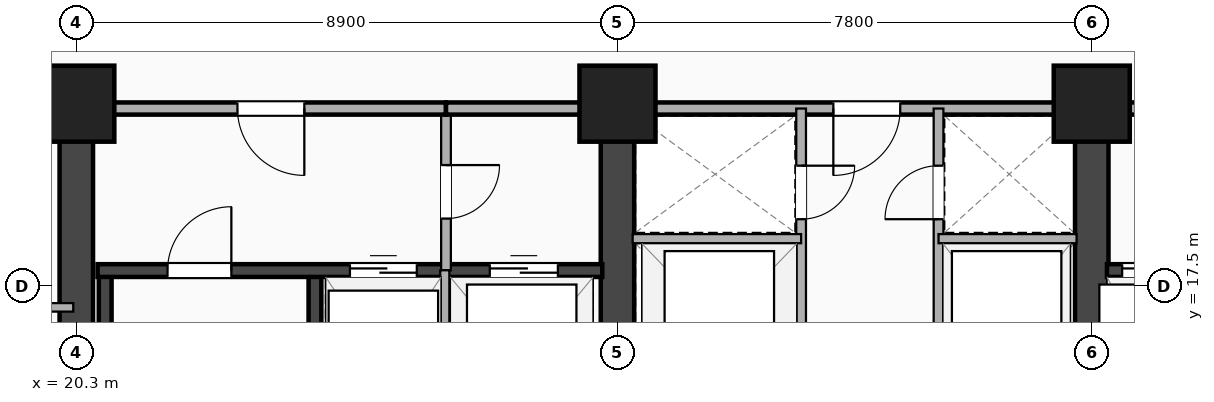
"""IFC4 building model, lengths in metres.
Left out: names, types, materials, properties, quantities, classifications, styles, units other than length and angle.
Written with IfcOpenShell. Run it as: python <this file> out.ifc"""

import sys

from ifc_helpers import new_model, si_unit, direction, frame, frame_2d, origin, origin_2d, place, context, subcontext, project, spatial, rectangle, extrude, element, fill, save


model = new_model("IFC4")
c1 = context("Model", 3, precision=1e-05, world=origin(), true_north=direction((0.0, 1.0)))
c2 = subcontext(c1, "Body", "Model", "MODEL_VIEW")
j1 = project(units=[si_unit("LENGTHUNIT", "METRE"), si_unit("PLANEANGLEUNIT", "RADIAN")], contexts=[c1])
p1 = place(None, origin())
s1 = spatial("IfcSite", under=j1, at=p1, CompositionType="ELEMENT")
p2 = place(p1, origin())
s2 = spatial("IfcBuilding", under=s1, at=p2, CompositionType="ELEMENT")
p3 = place(p2, frame((0.0, 0.0, 95.2)))
s3 = spatial("IfcBuildingStorey", under=s2, at=p3, CompositionType="ELEMENT", Elevation=95.2)
p4 = place(p3, frame((20.3, 3.5, 0.0), z_axis=(0.0, 0.0, 1.0), x_axis=(0.0, 1.0, 0.0)))
e1 = element("IfcWall", 1, at=p4, inside=s3, PredefinedType="SHEAR", context=c2, shape_type="SweptSolid", body=[
    extrude(rectangle(XDim=16.9, YDim=0.55, at=frame_2d((8.45, 0.0))), origin(), (0.0, 0.0, 1.0), 3.24),
])
p5 = place(p3, frame((29.2, 3.5, 0.0), z_axis=(0.0, 0.0, 1.0), x_axis=(0.0, 1.0, 0.0)))
e2 = element("IfcWall", 2, at=p5, inside=s3, PredefinedType="SHEAR", context=c2, shape_type="SweptSolid", body=[
    extrude(rectangle(XDim=16.9, YDim=0.55, at=frame_2d((8.45, 0.0))), origin(), (0.0, 0.0, 1.0), 3.24),
])
p6 = place(p5, frame((7.75, 0.0, 0.0), z_axis=(0.0, 0.0, 1.0), x_axis=(-1.0, 0.0, 0.0)))
e3 = element("IfcOpeningElement", 3, at=p6, cuts=e2, PredefinedType="OPENING", context=c2, shape_type="SweptSolid", body=[
    extrude(rectangle(XDim=1.1, YDim=2.15, at=frame_2d((0.55, 1.075))), frame((0.0, 0.285, 0.0), z_axis=(0.0, -1.0, 0.0), x_axis=(1.0, 0.0, 0.0)), (0.0, 0.0, 1.0), 0.57),
])
p7 = place(p3, frame((37.0, 3.5, 0.0), z_axis=(0.0, 0.0, 1.0), x_axis=(0.0, 1.0, 0.0)))
e4 = element("IfcWall", 4, at=p7, inside=s3, PredefinedType="SHEAR", context=c2, shape_type="SweptSolid", body=[
    extrude(rectangle(XDim=16.9, YDim=0.55, at=frame_2d((8.45, 0.0))), origin(), (0.0, 0.0, 1.0), 3.24),
])
p8 = place(p7, frame((6.65, 0.0, 0.0)))
e5 = element("IfcOpeningElement", 5, at=p8, cuts=e4, PredefinedType="OPENING", context=c2, shape_type="SweptSolid", body=[
    extrude(rectangle(XDim=1.1, YDim=2.15, at=frame_2d((0.55, 1.075))), frame((0.0, 0.285, 0.0), z_axis=(0.0, -1.0, 0.0), x_axis=(1.0, 0.0, 0.0)), (0.0, 0.0, 1.0), 0.57),
])
for number, where, z_axis, x_axis in (
    (6, (20.775, 9.745, 0.0), (0.0, 0.0, 1.0), (0.0, 1.0, 0.0)),
    (7, (24.225, 9.745, 0.0), (0.0, 0.0, 1.0), (0.0, 1.0, 0.0)),
):
    element("IfcWall", number, at=place(p3, frame(where, z_axis=z_axis, x_axis=x_axis)), inside=s3, PredefinedType="SHEAR", context=c2, shape_type="SweptSolid", body=[
        extrude(rectangle(XDim=8.01, YDim=0.21, at=frame_2d((4.005, 0.0))), origin(), (0.0, 0.0, 1.0), 3.24),
    ])
p9 = place(p3, frame((20.65, 17.755, 0.0), z_axis=(0.0, 0.0, 1.0), x_axis=(1.0, 0.0, 0.0)))
e8 = element("IfcWall", 8, at=p9, inside=s3, PredefinedType="SHEAR", context=c2, shape_type="SweptSolid", body=[
    extrude(rectangle(XDim=8.3, YDim=0.21, at=frame_2d((4.15, 0.0))), origin(), (0.0, 0.0, 1.0), 3.24),
])
p10 = place(p9, frame((2.2, 0.0, 0.0), z_axis=(0.0, 0.0, 1.0), x_axis=(-1.0, 0.0, 0.0)))
e9 = element("IfcOpeningElement", 9, at=p10, cuts=e8, PredefinedType="OPENING", context=c2, shape_type="SweptSolid", body=[
    extrude(rectangle(XDim=1.05, YDim=2.15, at=frame_2d((0.525, 1.075))), frame((0.0, 0.115, 0.0), z_axis=(0.0, -1.0, 0.0), x_axis=(1.0, 0.0, 0.0)), (0.0, 0.0, 1.0), 0.23),
])
p11 = place(p9, frame((4.15, 0.0, 0.0)))
e10 = element("IfcOpeningElement", 10, at=p11, cuts=e8, PredefinedType="OPENING", context=c2, shape_type="SweptSolid", body=[
    extrude(rectangle(XDim=1.1, YDim=2.18, at=frame_2d((0.55, 1.09))), frame((0.0, 0.115, 0.0), z_axis=(0.0, -1.0, 0.0), x_axis=(1.0, 0.0, 0.0)), (0.0, 0.0, 1.0), 0.23),
])
p12 = place(p9, frame((6.45, 0.0, 0.0)))
e11 = element("IfcOpeningElement", 11, at=p12, cuts=e8, PredefinedType="OPENING", context=c2, shape_type="SweptSolid", body=[
    extrude(rectangle(XDim=1.12, YDim=2.2, at=frame_2d((0.56, 1.1))), frame((0.0, 0.115, 0.0), z_axis=(0.0, -1.0, 0.0), x_axis=(1.0, 0.0, 0.0)), (0.0, 0.0, 1.0), 0.23),
])
p13 = place(p3, frame((37.25, 17.755, 0.0), z_axis=(0.0, 0.0, 1.0), x_axis=(1.0, 0.0, 0.0)))
e12 = element("IfcWall", 12, at=p13, inside=s3, PredefinedType="SHEAR", context=c2, shape_type="SweptSolid", body=[
    extrude(rectangle(XDim=7.2, YDim=0.21, at=frame_2d((3.6, 0.0))), origin(), (0.0, 0.0, 1.0), 3.24),
])
p14 = place(p13, frame((0.25, 0.0, 0.0)))
e13 = element("IfcOpeningElement", 13, at=p14, cuts=e12, PredefinedType="OPENING", context=c2, shape_type="SweptSolid", body=[
    extrude(rectangle(XDim=1.12, YDim=2.2, at=frame_2d((0.56, 1.1))), frame((0.0, 0.115, 0.0), z_axis=(0.0, -1.0, 0.0), x_axis=(1.0, 0.0, 0.0)), (0.0, 0.0, 1.0), 0.23),
])
p15 = place(p13, frame((2.05, 0.0, 0.0)))
e14 = element("IfcOpeningElement", 14, at=p15, cuts=e12, PredefinedType="OPENING", context=c2, shape_type="SweptSolid", body=[
    extrude(rectangle(XDim=1.1, YDim=2.18, at=frame_2d((0.55, 1.09))), frame((0.0, 0.115, 0.0), z_axis=(0.0, -1.0, 0.0), x_axis=(1.0, 0.0, 0.0)), (0.0, 0.0, 1.0), 0.23),
])
p16 = place(p13, frame((5.78, 0.0, 0.0), z_axis=(0.0, 0.0, 1.0), x_axis=(-1.0, 0.0, 0.0)))
e15 = element("IfcOpeningElement", 15, at=p16, cuts=e12, PredefinedType="OPENING", context=c2, shape_type="SweptSolid", body=[
    extrude(rectangle(XDim=1.05, YDim=2.15, at=frame_2d((0.525, 1.075))), frame((0.0, 0.115, 0.0), z_axis=(0.0, -1.0, 0.0), x_axis=(1.0, 0.0, 0.0)), (0.0, 0.0, 1.0), 0.23),
])
for number, where, z_axis, x_axis in (
    (16, (20.3, 20.5, -0.26), (0.0, 0.0, 1.0), (1.0, 0.0, 0.0)),
    (17, (29.2, 20.5, -0.26), (0.0, 0.0, 1.0), (1.0, 0.0, 0.0)),
    (18, (37.0, 20.5, -0.26), (0.0, 0.0, 1.0), (1.0, 0.0, 0.0)),
):
    element("IfcColumn", number, at=place(p3, frame(where, z_axis=z_axis, x_axis=x_axis)), inside=s3, PredefinedType="COLUMN", context=c2, shape_type="SweptSolid", body=[
        extrude(rectangle(XDim=1.25, YDim=1.25, at=origin_2d()), origin(), (0.0, 0.0, 1.0), 3.5),
    ])
p17 = place(p3, frame((26.38, 17.76, 0.0), z_axis=(0.0, 0.0, 1.0), x_axis=(0.0, 1.0, 0.0)))
e19 = element("IfcWall", 19, at=p17, inside=s3, PredefinedType="PARTITIONING", context=c2, shape_type="SweptSolid", body=[
    extrude(rectangle(XDim=2.66, YDim=0.16, at=frame_2d((1.33, 0.0))), origin(), (0.0, 0.0, 1.0), 2.614),
])
p18 = place(p17, frame((0.85, 0.0, 0.0)))
e20 = element("IfcOpeningElement", 20, at=p18, cuts=e19, PredefinedType="OPENING", context=c2, shape_type="SweptSolid", body=[
    extrude(rectangle(XDim=0.88, YDim=2.08, at=frame_2d((0.44, 1.04))), frame((0.0, 0.09, 0.0), z_axis=(0.0, -1.0, 0.0), x_axis=(1.0, 0.0, 0.0)), (0.0, 0.0, 1.0), 0.18),
])
p19 = place(p3, frame((26.36, 14.72, 0.0), z_axis=(0.0, 0.0, 1.0), x_axis=(0.0, 1.0, 0.0)))
e21 = element("IfcWall", 21, at=p19, inside=s3, PredefinedType="PARTITIONING", context=c2, shape_type="SweptSolid", body=[
    extrude(rectangle(XDim=3.04, YDim=0.15, at=frame_2d((1.52, 0.0))), origin(), (0.0, 0.0, 1.0), 3.24),
])
p20 = place(p3, frame((20.65, 20.42, 0.0), z_axis=(0.0, 0.0, 1.0), x_axis=(1.0, 0.0, 0.0)))
e22 = element("IfcWall", 22, at=p20, inside=s3, PredefinedType="PARTITIONING", context=c2, shape_type="SweptSolid", body=[
    extrude(rectangle(XDim=5.73, YDim=0.2, at=frame_2d((2.865, 0.0))), origin(), (0.0, 0.0, 1.0), 2.313),
])
p21 = place(p20, frame((2.3, 0.0, 0.0)))
e23 = element("IfcOpeningElement", 23, at=p21, cuts=e22, PredefinedType="OPENING", context=c2, shape_type="SweptSolid", body=[
    extrude(rectangle(XDim=1.1, YDim=2.15, at=frame_2d((0.55, 1.075))), frame((0.0, 0.11, 0.0), z_axis=(0.0, -1.0, 0.0), x_axis=(1.0, 0.0, 0.0)), (0.0, 0.0, 1.0), 0.22),
])
p22 = place(p3, frame((26.38, 20.42, 0.0), z_axis=(0.0, 0.0, 1.0), x_axis=(1.0, 0.0, 0.0)))
e24 = element("IfcWall", 24, at=p22, inside=s3, PredefinedType="PARTITIONING", context=c2, shape_type="SweptSolid", body=[
    extrude(rectangle(XDim=2.82, YDim=0.2, at=frame_2d((1.41, 0.0))), origin(), (0.0, 0.0, 1.0), 2.313),
])
p23 = place(p3, frame((29.2, 20.42, 0.0), z_axis=(0.0, 0.0, 1.0), x_axis=(1.0, 0.0, 0.0)))
e25 = element("IfcWall", 25, at=p23, inside=s3, PredefinedType="PARTITIONING", context=c2, shape_type="SweptSolid", body=[
    extrude(rectangle(XDim=7.8, YDim=0.2, at=frame_2d((3.9, 0.0))), origin(), (0.0, 0.0, 1.0), 2.313),
])
p24 = place(p23, frame((3.55, 0.0, 0.0)))
e26 = element("IfcOpeningElement", 26, at=p24, cuts=e25, PredefinedType="OPENING", context=c2, shape_type="SweptSolid", body=[
    extrude(rectangle(XDim=1.1, YDim=2.15, at=frame_2d((0.55, 1.075))), frame((0.0, 0.11, 0.0), z_axis=(0.0, -1.0, 0.0), x_axis=(1.0, 0.0, 0.0)), (0.0, 0.0, 1.0), 0.22),
])
p25 = place(p3, frame((37.0, 20.42, 0.0), z_axis=(0.0, 0.0, 1.0), x_axis=(1.0, 0.0, 0.0)))
e27 = element("IfcWall", 27, at=p25, inside=s3, PredefinedType="PARTITIONING", context=c2, shape_type="SweptSolid", body=[
    extrude(rectangle(XDim=7.45, YDim=0.2, at=frame_2d((3.725, 0.0))), origin(), (0.0, 0.0, 1.0), 2.313),
])
p26 = place(p25, frame((4.2, 0.0, 0.0)))
e28 = element("IfcOpeningElement", 28, at=p26, cuts=e27, PredefinedType="OPENING", context=c2, shape_type="SweptSolid", body=[
    extrude(rectangle(XDim=1.1, YDim=2.15, at=frame_2d((0.55, 1.075))), frame((0.0, 0.11, 0.0), z_axis=(0.0, -1.0, 0.0), x_axis=(1.0, 0.0, 0.0)), (0.0, 0.0, 1.0), 0.22),
])
p27 = place(p3, frame((32.22, 12.5, 0.0), z_axis=(0.0, 0.0, 1.0), x_axis=(0.0, 1.0, 0.0)))
e29 = element("IfcWall", 29, at=p27, inside=s3, PredefinedType="PARTITIONING", context=c2, shape_type="SweptSolid", body=[
    extrude(rectangle(XDim=7.92, YDim=0.16, at=frame_2d((3.96, 0.0))), origin(), (0.0, 0.0, 1.0), 2.614),
])
p28 = place(p27, frame((1.43, 0.0, 0.0), z_axis=(0.0, 0.0, 1.0), x_axis=(-1.0, 0.0, 0.0)))
e30 = element("IfcOpeningElement", 30, at=p28, cuts=e29, PredefinedType="OPENING", context=c2, shape_type="SweptSolid", body=[
    extrude(rectangle(XDim=1.08, YDim=2.16, at=frame_2d((0.54, 1.08))), frame((0.0, 0.09, 0.0), z_axis=(0.0, -1.0, 0.0), x_axis=(1.0, 0.0, 0.0)), (0.0, 0.0, 1.0), 0.18),
])
p29 = place(p27, frame((4.33, 0.0, 0.0), z_axis=(0.0, 0.0, 1.0), x_axis=(-1.0, 0.0, 0.0)))
e31 = element("IfcOpeningElement", 31, at=p29, cuts=e29, PredefinedType="OPENING", context=c2, shape_type="SweptSolid", body=[
    extrude(rectangle(XDim=1.08, YDim=2.16, at=frame_2d((0.54, 1.08))), frame((0.0, 0.09, 0.0), z_axis=(0.0, -1.0, 0.0), x_axis=(1.0, 0.0, 0.0)), (0.0, 0.0, 1.0), 0.18),
])
p30 = place(p27, frame((6.1, 0.0, 0.0)))
e32 = element("IfcOpeningElement", 32, at=p30, cuts=e29, PredefinedType="OPENING", context=c2, shape_type="SweptSolid", body=[
    extrude(rectangle(XDim=0.88, YDim=2.08, at=frame_2d((0.44, 1.04))), frame((0.0, 0.09, 0.0), z_axis=(0.0, -1.0, 0.0), x_axis=(1.0, 0.0, 0.0)), (0.0, 0.0, 1.0), 0.18),
])
p31 = place(p3, frame((34.48, 12.5, 0.0), z_axis=(0.0, 0.0, 1.0), x_axis=(0.0, 1.0, 0.0)))
e33 = element("IfcWall", 33, at=p31, inside=s3, PredefinedType="PARTITIONING", context=c2, shape_type="SweptSolid", body=[
    extrude(rectangle(XDim=7.92, YDim=0.16, at=frame_2d((3.96, 0.0))), origin(), (0.0, 0.0, 1.0), 2.614),
])
p32 = place(p31, frame((0.35, 0.0, 0.0)))
e34 = element("IfcOpeningElement", 34, at=p32, cuts=e33, PredefinedType="OPENING", context=c2, shape_type="SweptSolid", body=[
    extrude(rectangle(XDim=1.08, YDim=2.16, at=frame_2d((0.54, 1.08))), frame((0.0, 0.09, 0.0), z_axis=(0.0, -1.0, 0.0), x_axis=(1.0, 0.0, 0.0)), (0.0, 0.0, 1.0), 0.18),
])
p33 = place(p31, frame((3.25, 0.0, 0.0)))
e35 = element("IfcOpeningElement", 35, at=p33, cuts=e33, PredefinedType="OPENING", context=c2, shape_type="SweptSolid", body=[
    extrude(rectangle(XDim=1.08, YDim=2.16, at=frame_2d((0.54, 1.08))), frame((0.0, 0.09, 0.0), z_axis=(0.0, -1.0, 0.0), x_axis=(1.0, 0.0, 0.0)), (0.0, 0.0, 1.0), 0.18),
])
p34 = place(p31, frame((6.98, 0.0, 0.0), z_axis=(0.0, 0.0, 1.0), x_axis=(-1.0, 0.0, 0.0)))
e36 = element("IfcOpeningElement", 36, at=p34, cuts=e33, PredefinedType="OPENING", context=c2, shape_type="SweptSolid", body=[
    extrude(rectangle(XDim=0.88, YDim=2.08, at=frame_2d((0.44, 1.04))), frame((0.0, 0.09, 0.0), z_axis=(0.0, -1.0, 0.0), x_axis=(1.0, 0.0, 0.0)), (0.0, 0.0, 1.0), 0.18),
])
p35 = place(p3, frame((29.45, 18.28, 0.0), z_axis=(0.0, 0.0, 1.0), x_axis=(1.0, 0.0, 0.0)))
e37 = element("IfcWall", 37, at=p35, inside=s3, PredefinedType="PARTITIONING", context=c2, shape_type="SweptSolid", body=[
    extrude(rectangle(XDim=2.77, YDim=0.15, at=frame_2d((1.385, 0.0))), origin(), (0.0, 0.0, 1.0), 3.24),
])
p36 = place(p3, frame((34.48, 18.28, 0.0), z_axis=(0.0, 0.0, 1.0), x_axis=(1.0, 0.0, 0.0)))
e38 = element("IfcWall", 38, at=p36, inside=s3, PredefinedType="PARTITIONING", context=c2, shape_type="SweptSolid", body=[
    extrude(rectangle(XDim=2.27, YDim=0.15, at=frame_2d((1.135, 0.0))), origin(), (0.0, 0.0, 1.0), 3.24),
])
p37 = place(p3, frame((18.65, 20.42, 0.0), z_axis=(0.0, 0.0, 1.0), x_axis=(1.0, 0.0, 0.0)))
e39 = element("IfcWall", 39, at=p37, inside=s3, PredefinedType="PARTITIONING", context=c2, shape_type="SweptSolid", body=[
    extrude(rectangle(XDim=1.65, YDim=0.16, at=frame_2d((0.825, 0.0))), origin(), (0.0, 0.0, 1.0), 2.313),
])
p38 = place(p3, frame((18.65, 17.15, 0.0), z_axis=(0.0, 0.0, 1.0), x_axis=(1.0, 0.0, 0.0)))
e40 = element("IfcWall", 40, at=p38, inside=s3, PredefinedType="PARTITIONING", context=c2, shape_type="SweptSolid", body=[
    extrude(rectangle(XDim=1.6, YDim=0.14, at=frame_2d((0.8, 0.0))), origin(), (0.0, 0.0, 1.0), 2.313),
])
p39 = place(p38, frame((1.193, 0.0, 0.0), z_axis=(0.0, 0.0, 1.0), x_axis=(-1.0, 0.0, 0.0)))
e41 = element("IfcOpeningElement", 41, at=p39, cuts=e40, PredefinedType="OPENING", context=c2, shape_type="SweptSolid", body=[
    extrude(rectangle(XDim=0.88, YDim=2.08, at=frame_2d((0.44, 1.04))), frame((0.0, 0.08, 0.0), z_axis=(0.0, -1.0, 0.0), x_axis=(1.0, 0.0, 0.0)), (0.0, 0.0, 1.0), 0.16),
])
p40 = place(p10, origin())
e42 = element("IfcDoor", 42, at=p40, inside=s3, OperationType="SINGLE_SWING_RIGHT", PredefinedType="DOOR", context=c2, shape_type="SweptSolid", body=[
    extrude(rectangle(XDim=1.05, YDim=2.15, at=frame_2d((0.525, 1.075))), frame((0.0, 0.025, 0.0), z_axis=(0.0, -1.0, 0.0), x_axis=(1.0, 0.0, 0.0)), (0.0, 0.0, 1.0), 0.05),
])
fill(e9, e42)
p41 = place(p11, origin())
e43 = element("IfcDoor", 43, at=p41, inside=s3, OperationType="DOUBLE_DOOR_SLIDING", PredefinedType="DOOR", context=c2, shape_type="SweptSolid", body=[
    extrude(rectangle(XDim=1.1, YDim=2.18, at=frame_2d((0.55, 1.09))), frame((0.0, 0.025, 0.0), z_axis=(0.0, -1.0, 0.0), x_axis=(1.0, 0.0, 0.0)), (0.0, 0.0, 1.0), 0.05),
])
fill(e10, e43)
p42 = place(p12, origin())
e44 = element("IfcDoor", 44, at=p42, inside=s3, OperationType="DOUBLE_DOOR_SLIDING", PredefinedType="DOOR", context=c2, shape_type="SweptSolid", body=[
    extrude(rectangle(XDim=1.12, YDim=2.2, at=frame_2d((0.56, 1.1))), frame((0.0, 0.025, 0.0), z_axis=(0.0, -1.0, 0.0), x_axis=(1.0, 0.0, 0.0)), (0.0, 0.0, 1.0), 0.05),
])
fill(e11, e44)
p43 = place(p14, origin())
e45 = element("IfcDoor", 45, at=p43, inside=s3, OperationType="DOUBLE_DOOR_SLIDING", PredefinedType="DOOR", context=c2, shape_type="SweptSolid", body=[
    extrude(rectangle(XDim=1.12, YDim=2.2, at=frame_2d((0.56, 1.1))), frame((0.0, 0.025, 0.0), z_axis=(0.0, -1.0, 0.0), x_axis=(1.0, 0.0, 0.0)), (0.0, 0.0, 1.0), 0.05),
])
fill(e13, e45)
p44 = place(p18, origin())
e46 = element("IfcDoor", 46, at=p44, inside=s3, OperationType="SINGLE_SWING_RIGHT", PredefinedType="DOOR", context=c2, shape_type="SweptSolid", body=[
    extrude(rectangle(XDim=0.88, YDim=2.08, at=frame_2d((0.44, 1.04))), frame((0.0, 0.025, 0.0), z_axis=(0.0, -1.0, 0.0), x_axis=(1.0, 0.0, 0.0)), (0.0, 0.0, 1.0), 0.05),
])
fill(e20, e46)
p45 = place(p21, origin())
e47 = element("IfcDoor", 47, at=p45, inside=s3, OperationType="SINGLE_SWING_RIGHT", PredefinedType="DOOR", context=c2, shape_type="SweptSolid", body=[
    extrude(rectangle(XDim=1.1, YDim=2.15, at=frame_2d((0.55, 1.075))), frame((0.0, 0.025, 0.0), z_axis=(0.0, -1.0, 0.0), x_axis=(1.0, 0.0, 0.0)), (0.0, 0.0, 1.0), 0.05),
])
fill(e23, e47)
p46 = place(p24, origin())
e48 = element("IfcDoor", 48, at=p46, inside=s3, OperationType="SINGLE_SWING_LEFT", PredefinedType="DOOR", context=c2, shape_type="SweptSolid", body=[
    extrude(rectangle(XDim=1.1, YDim=2.15, at=frame_2d((0.55, 1.075))), frame((0.0, 0.025, 0.0), z_axis=(0.0, -1.0, 0.0), x_axis=(1.0, 0.0, 0.0)), (0.0, 0.0, 1.0), 0.05),
])
fill(e26, e48)
p47 = place(p30, origin())
e49 = element("IfcDoor", 49, at=p47, inside=s3, OperationType="SINGLE_SWING_RIGHT", PredefinedType="DOOR", context=c2, shape_type="SweptSolid", body=[
    extrude(rectangle(XDim=0.88, YDim=2.08, at=frame_2d((0.44, 1.04))), frame((0.0, 0.025, 0.0), z_axis=(0.0, -1.0, 0.0), x_axis=(1.0, 0.0, 0.0)), (0.0, 0.0, 1.0), 0.05),
])
fill(e32, e49)
p48 = place(p34, origin())
e50 = element("IfcDoor", 50, at=p48, inside=s3, OperationType="SINGLE_SWING_LEFT", PredefinedType="DOOR", context=c2, shape_type="SweptSolid", body=[
    extrude(rectangle(XDim=0.88, YDim=2.08, at=frame_2d((0.44, 1.04))), frame((0.0, 0.025, 0.0), z_axis=(0.0, -1.0, 0.0), x_axis=(1.0, 0.0, 0.0)), (0.0, 0.0, 1.0), 0.05),
])
fill(e36, e50)
save(model, sys.argv[1])
